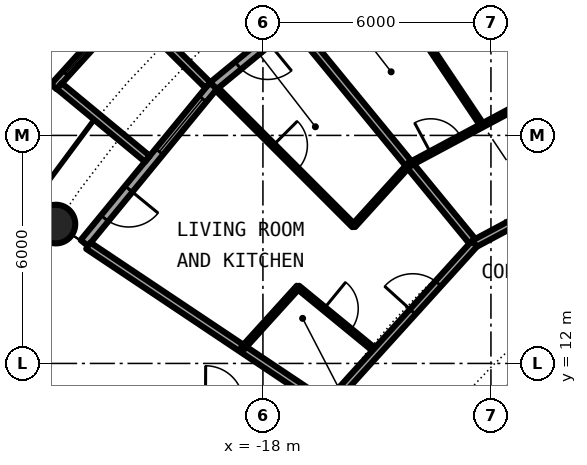
"""IFC4 building model, lengths in metres.
Left out: names, types, materials, properties, quantities, classifications, styles, units other than length and angle.
Written with IfcOpenShell. Run it as: python <this file> out.ifc"""

import sys

from ifc_helpers import new_model, si_unit, direction, frame, frame_2d, origin, origin_2d, place, context, subcontext, project, spatial, rectangle, circle, hollow_circle, extrude, element, fill, save


model = new_model("IFC4")
c1 = context("Model", 3, precision=1e-05, world=origin(), true_north=direction((0.0, 1.0)))
c2 = subcontext(c1, "Body", "Model", "MODEL_VIEW")
j1 = project(units=[si_unit("LENGTHUNIT", "METRE"), si_unit("PLANEANGLEUNIT", "RADIAN")], contexts=[c1])
p1 = place(None, origin())
s1 = spatial("IfcSite", under=j1, at=p1, CompositionType="ELEMENT")
p2 = place(p1, origin())
s2 = spatial("IfcBuilding", under=s1, at=p2, CompositionType="ELEMENT")
p3 = place(p2, frame((0.0, 0.0, 75.8)))
s3 = spatial("IfcBuildingStorey", under=s2, at=p3, CompositionType="ELEMENT", Elevation=75.8)
p4 = place(p3, frame((-23.448, 15.667, 0.0), z_axis=(0.0, 0.0, 1.0), x_axis=(1.0, 0.0, 0.0)))
e1 = element("IfcColumn", 1, at=p4, inside=s3, PredefinedType="COLUMN", context=c2, shape_type="SweptSolid", body=[
    extrude(hollow_circle(Radius=0.508, WallThickness=0.04, at=origin_2d()), origin(), (0.0, 0.0, 1.0), 3.05),
])
p5 = place(p3, frame((-15.167, 22.699, 0.0), z_axis=(0.0, 0.0, 1.0), x_axis=(-0.773019449054, -0.634382322723, 0.0)))
e2 = element("IfcWall", 2, at=p5, inside=s3, PredefinedType="SOLIDWALL", context=c2, shape_type="SweptSolid", body=[
    extrude(rectangle(XDim=5.352, YDim=0.25, at=frame_2d((2.676, 0.0))), origin(), (0.0, 0.0, 1.0), 2.7),
])
p6 = place(p5, frame((0.441, 0.0, 0.3)))
e3 = element("IfcOpeningElement", 3, at=p6, cuts=e2, PredefinedType="OPENING", context=c2, shape_type="SweptSolid", body=[
    extrude(rectangle(XDim=1.8, YDim=2.1, at=frame_2d((0.9, 1.05))), frame((0.0, 0.135, 0.0), z_axis=(0.0, -1.0, 0.0), x_axis=(1.0, 0.0, 0.0)), (0.0, 0.0, 1.0), 0.27),
])
p7 = place(p5, frame((3.51, 0.0, 0.0)))
e4 = element("IfcOpeningElement", 4, at=p7, cuts=e2, PredefinedType="OPENING", context=c2, shape_type="SweptSolid", body=[
    extrude(rectangle(XDim=1.0, YDim=2.2, at=frame_2d((0.5, 1.1))), frame((0.0, 0.135, 0.0), z_axis=(0.0, -1.0, 0.0), x_axis=(1.0, 0.0, 0.0)), (0.0, 0.0, 1.0), 0.27),
])
p8 = place(p3, frame((-19.304, 19.304, 0.0), z_axis=(0.0, 0.0, 1.0), x_axis=(-0.634382322723, -0.773019449054, 0.0)))
e5 = element("IfcWall", 5, at=p8, inside=s3, PredefinedType="SOLIDWALL", context=c2, shape_type="SweptSolid", body=[
    extrude(rectangle(XDim=5.352, YDim=0.25, at=frame_2d((2.676, 0.0))), origin(), (0.0, 0.0, 1.0), 2.7),
])
p9 = place(p8, frame((0.441, 0.0, 0.3)))
e6 = element("IfcOpeningElement", 6, at=p9, cuts=e5, PredefinedType="OPENING", context=c2, shape_type="SweptSolid", body=[
    extrude(rectangle(XDim=1.8, YDim=2.1, at=frame_2d((0.9, 1.05))), frame((0.0, 0.135, 0.0), z_axis=(0.0, -1.0, 0.0), x_axis=(1.0, 0.0, 0.0)), (0.0, 0.0, 1.0), 0.27),
])
p10 = place(p8, frame((3.51, 0.0, 0.0)))
e7 = element("IfcOpeningElement", 7, at=p10, cuts=e5, PredefinedType="OPENING", context=c2, shape_type="SweptSolid", body=[
    extrude(rectangle(XDim=1.0, YDim=2.2, at=frame_2d((0.5, 1.1))), frame((0.0, 0.135, 0.0), z_axis=(0.0, -1.0, 0.0), x_axis=(1.0, 0.0, 0.0)), (0.0, 0.0, 1.0), 0.27),
])
p11 = place(p3, frame((-21.493, 21.5, -0.03), z_axis=(0.0, 0.0, 1.0), x_axis=(-0.671506829416, -0.740998365753, 0.0)))
e8 = element("IfcWall", 8, at=p11, inside=s3, PredefinedType="SOLIDWALL", context=c2, shape_type="SweptSolid", body=[
    extrude(rectangle(XDim=2.993, YDim=0.2, at=frame_2d((1.497, 0.0))), origin(), (0.0, 0.0, 1.0), 2.73),
])
p12 = place(p11, frame((0.457, 0.0, 0.33)))
e9 = element("IfcOpeningElement", 9, at=p12, cuts=e8, PredefinedType="OPENING", context=c2, shape_type="SweptSolid", body=[
    extrude(circle(Radius=1.04, at=frame_2d((1.04, 1.04))), frame((0.0, 0.11, 0.0), z_axis=(0.0, -1.0, 0.0), x_axis=(1.0, 0.0, 0.0)), (0.0, 0.0, 1.0), 0.22),
])
p13 = place(p3, frame((-19.45, 19.323, -0.03), z_axis=(0.0, 0.0, 1.0), x_axis=(-0.709727076896, 0.704476739375, 0.0)))
e10 = element("IfcWall", 10, at=p13, inside=s3, PredefinedType="SOLIDWALL", context=c2, shape_type="SweptSolid", body=[
    extrude(rectangle(XDim=2.883, YDim=0.2, at=frame_2d((1.441, 0.0))), origin(), (0.0, 0.0, 1.0), 2.73),
])
p14 = place(p3, frame((-21.041, 17.384, -0.03), z_axis=(0.0, 0.0, 1.0), x_axis=(-0.770784861449, 0.63709551667, 0.0)))
e11 = element("IfcWall", 11, at=p14, inside=s3, PredefinedType="SOLIDWALL", context=c2, shape_type="SweptSolid", body=[
    extrude(rectangle(XDim=3.006, YDim=0.2, at=frame_2d((1.503, 0.0))), origin(), (0.0, 0.0, 1.0), 2.73),
])
p15 = place(p3, frame((-22.595, 15.098, 0.0), z_axis=(0.0, 0.0, 1.0), x_axis=(0.831382022135, -0.555701298605, 0.0)))
e12 = element("IfcWall", 12, at=p15, inside=s3, PredefinedType="PARTITIONING", context=c2, shape_type="SweptSolid", body=[
    extrude(rectangle(XDim=7.313, YDim=0.2, at=frame_2d((3.657, 0.0))), origin(), (0.0, 0.0, 1.0), 2.7),
])
p16 = place(p3, frame((-19.211, 19.221, 0.0), z_axis=(0.0, 0.0, 1.0), x_axis=(0.706914880313, -0.707298629994, 0.0)))
e13 = element("IfcWall", 13, at=p16, inside=s3, PredefinedType="PARTITIONING", context=c2, shape_type="SweptSolid", body=[
    extrude(rectangle(XDim=5.09, YDim=0.1, at=frame_2d((2.545, 0.0))), origin(), (0.0, 0.0, 1.0), 2.7),
])
p17 = place(p16, frame((2.095, 0.0, 0.0)))
e14 = element("IfcOpeningElement", 14, at=p17, cuts=e13, PredefinedType="OPENING", context=c2, shape_type="SweptSolid", body=[
    extrude(rectangle(XDim=0.9, YDim=2.3, at=frame_2d((0.45, 1.15))), frame((0.0, 0.06, 0.0), z_axis=(0.0, -1.0, 0.0), x_axis=(1.0, 0.0, 0.0)), (0.0, 0.0, 1.0), 0.12),
])
p18 = place(p3, frame((-17.243, 21.005, 0.0), z_axis=(0.0, 0.0, 1.0), x_axis=(0.63447412651, -0.772944100689, 0.0)))
e15 = element("IfcWall", 15, at=p18, inside=s3, PredefinedType="PARTITIONING", context=c2, shape_type="SweptSolid", body=[
    extrude(rectangle(XDim=7.576, YDim=0.2, at=frame_2d((3.788, 0.0))), origin(), (0.0, 0.0, 1.0), 2.7),
])
p19 = place(p3, frame((-17.078, 14.005, 0.0), z_axis=(0.0, 0.0, 1.0), x_axis=(0.773240932873, -0.634112339992, 0.0)))
e16 = element("IfcWall", 16, at=p19, inside=s3, PredefinedType="PARTITIONING", context=c2, shape_type="SweptSolid", body=[
    extrude(rectangle(XDim=2.674, YDim=0.1, at=frame_2d((1.337, 0.0))), origin(), (0.0, 0.0, 1.0), 2.7),
])
p20 = place(p19, frame((0.887, 0.0, 0.0)))
e17 = element("IfcOpeningElement", 17, at=p20, cuts=e16, PredefinedType="OPENING", context=c2, shape_type="SweptSolid", body=[
    extrude(rectangle(XDim=0.9, YDim=2.3, at=frame_2d((0.45, 1.15))), frame((0.0, 0.06, 0.0), z_axis=(0.0, -1.0, 0.0), x_axis=(1.0, 0.0, 0.0)), (0.0, 0.0, 1.0), 0.12),
])
p21 = place(p3, frame((-15.119, 22.581, 0.0), z_axis=(0.0, 0.0, 1.0), x_axis=(0.556271707676, -0.83100047367, 0.0)))
e18 = element("IfcWall", 18, at=p21, inside=s3, PredefinedType="PARTITIONING", context=c2, shape_type="SweptSolid", body=[
    extrude(rectangle(XDim=5.195, YDim=0.1, at=frame_2d((2.598, 0.0))), origin(), (0.0, 0.0, 1.0), 2.7),
])
p22 = place(p3, frame((-12.81, 23.966, 0.0), z_axis=(0.0, 0.0, 1.0), x_axis=(0.47140999111, -0.881914179658, 0.0)))
e19 = element("IfcWall", 19, at=p22, inside=s3, PredefinedType="PARTITIONING", context=c2, shape_type="SweptSolid", body=[
    extrude(rectangle(XDim=5.303, YDim=0.1, at=frame_2d((2.652, 0.0))), origin(), (0.0, 0.0, 1.0), 2.7),
])
p23 = place(p22, frame((2.202, 0.0, 0.0)))
e20 = element("IfcOpeningElement", 20, at=p23, cuts=e19, PredefinedType="OPENING", context=c2, shape_type="SweptSolid", body=[
    extrude(rectangle(XDim=0.9, YDim=2.3, at=frame_2d((0.45, 1.15))), frame((0.0, 0.06, 0.0), z_axis=(0.0, -1.0, 0.0), x_axis=(1.0, 0.0, 0.0)), (0.0, 0.0, 1.0), 0.12),
])
p24 = place(p3, frame((-12.745, 10.358, 0.0), z_axis=(0.0, 0.0, 1.0), x_axis=(0.803191461888, 0.595720971219, 0.0)))
e21 = element("IfcWall", 21, at=p24, inside=s3, PredefinedType="PARTITIONING", context=c2, shape_type="SweptSolid", body=[
    extrude(rectangle(XDim=9.76, YDim=0.2, at=frame_2d((4.88, 0.0))), origin(), (0.0, 0.0, 1.0), 2.7),
])
p25 = place(p24, frame((4.38, 0.0, 0.0)))
e22 = element("IfcOpeningElement", 22, at=p25, cuts=e21, PredefinedType="OPENING", context=c2, shape_type="SweptSolid", body=[
    extrude(rectangle(XDim=1.0, YDim=2.3, at=frame_2d((0.5, 1.15))), frame((0.0, 0.11, 0.0), z_axis=(0.0, -1.0, 0.0), x_axis=(1.0, 0.0, 0.0)), (0.0, 0.0, 1.0), 0.22),
])
p26 = place(p3, frame((-12.434, 15.151, 0.0), z_axis=(0.0, 0.0, 1.0), x_axis=(0.881899173092, 0.47143806433, 0.0)))
e23 = element("IfcWall", 23, at=p26, inside=s3, PredefinedType="PARTITIONING", context=c2, shape_type="SweptSolid", body=[
    extrude(rectangle(XDim=7.647, YDim=0.2, at=frame_2d((3.824, 0.0))), origin(), (0.0, 0.0, 1.0), 2.38),
])
p27 = place(p26, frame((2.55, 0.0, 0.0)))
e24 = element("IfcOpeningElement", 24, at=p27, cuts=e23, PredefinedType="OPENING", context=c2, shape_type="SweptSolid", body=[
    extrude(rectangle(XDim=1.0, YDim=2.3, at=frame_2d((0.5, 1.15))), frame((0.0, 0.11, 0.0), z_axis=(0.0, -1.0, 0.0), x_axis=(1.0, 0.0, 0.0)), (0.0, 0.0, 1.0), 0.22),
])
p28 = place(p3, frame((-16.193, 11.004, 0.0), z_axis=(0.0, 0.0, 1.0), x_axis=(0.671601747072, 0.740912338492, 0.0)))
e25 = element("IfcWall", 25, at=p28, inside=s3, PredefinedType="PARTITIONING", context=c2, shape_type="SweptSolid", body=[
    extrude(rectangle(XDim=5.597, YDim=0.2, at=frame_2d((2.799, 0.0))), origin(), (0.0, 0.0, 1.0), 2.38),
])
p29 = place(p28, frame((3.18, 0.0, 0.0)))
e26 = element("IfcOpeningElement", 26, at=p29, cuts=e25, PredefinedType="OPENING", context=c2, shape_type="SweptSolid", body=[
    extrude(rectangle(XDim=1.0, YDim=2.3, at=frame_2d((0.5, 1.15))), frame((0.0, 0.11, 0.0), z_axis=(0.0, -1.0, 0.0), x_axis=(1.0, 0.0, 0.0)), (0.0, 0.0, 1.0), 0.22),
])
p30 = place(p3, frame((-14.148, 17.236, 0.0), z_axis=(0.0, 0.0, 1.0), x_axis=(0.881763472003, 0.471691826769, 0.0)))
e27 = element("IfcWall", 27, at=p30, inside=s3, PredefinedType="PARTITIONING", context=c2, shape_type="SweptSolid", body=[
    extrude(rectangle(XDim=4.35, YDim=0.1, at=frame_2d((2.175, 0.0))), origin(), (0.0, 0.0, 1.0), 2.7),
])
p31 = place(p30, frame((0.639, 0.0, 0.0)))
e28 = element("IfcOpeningElement", 28, at=p31, cuts=e27, PredefinedType="OPENING", context=c2, shape_type="SweptSolid", body=[
    extrude(rectangle(XDim=0.9, YDim=2.3, at=frame_2d((0.45, 1.15))), frame((0.0, 0.06, 0.0), z_axis=(0.0, -1.0, 0.0), x_axis=(1.0, 0.0, 0.0)), (0.0, 0.0, 1.0), 0.12),
])
p32 = place(p3, frame((-18.538, 12.394, 0.0), z_axis=(0.0, 0.0, 1.0), x_axis=(0.67169789574, 0.740825172937, 0.0)))
e29 = element("IfcWall", 29, at=p32, inside=s3, PredefinedType="PARTITIONING", context=c2, shape_type="SweptSolid", body=[
    extrude(rectangle(XDim=2.183, YDim=0.1, at=frame_2d((1.091, 0.0))), origin(), (0.0, 0.0, 1.0), 2.7),
])
p33 = place(p3, frame((-15.612, 15.622, 0.0), z_axis=(0.0, 0.0, 1.0), x_axis=(0.671674967707, 0.740845960882, 0.0)))
e30 = element("IfcWall", 30, at=p33, inside=s3, PredefinedType="PARTITIONING", context=c2, shape_type="SweptSolid", body=[
    extrude(rectangle(XDim=2.181, YDim=0.1, at=frame_2d((1.091, 0.0))), origin(), (0.0, 0.0, 1.0), 2.7),
])
p34 = place(p7, origin())
e31 = element("IfcDoor", 31, at=p34, inside=s3, OperationType="SINGLE_SWING_LEFT", PredefinedType="DOOR", context=c2, shape_type="SweptSolid", body=[
    extrude(rectangle(XDim=1.0, YDim=2.2, at=frame_2d((0.5, 1.1))), frame((0.0, 0.025, 0.0), z_axis=(0.0, -1.0, 0.0), x_axis=(1.0, 0.0, 0.0)), (0.0, 0.0, 1.0), 0.05),
])
fill(e4, e31)
p35 = place(p9, origin())
e32 = element("IfcWindow", 32, at=p35, inside=s3, PartitioningType="SINGLE_PANEL", PredefinedType="WINDOW", context=c2, shape_type="SweptSolid", body=[
    extrude(rectangle(XDim=1.8, YDim=2.1, at=frame_2d((0.9, 1.05))), frame((0.0, 0.03, 0.0), z_axis=(0.0, -1.0, 0.0), x_axis=(1.0, 0.0, 0.0)), (0.0, 0.0, 1.0), 0.06),
])
fill(e6, e32)
p36 = place(p12, origin())
e33 = element("IfcWindow", 33, at=p36, inside=s3, PartitioningType="SINGLE_PANEL", PredefinedType="WINDOW", context=c2, shape_type="SweptSolid", body=[
    extrude(circle(Radius=1.04, at=frame_2d((1.04, 1.04))), frame((0.0, 0.03, 0.0), z_axis=(0.0, -1.0, 0.0), x_axis=(1.0, 0.0, 0.0)), (0.0, 0.0, 1.0), 0.06),
])
fill(e9, e33)
p37 = place(p10, origin())
e34 = element("IfcDoor", 34, at=p37, inside=s3, OperationType="SINGLE_SWING_LEFT", PredefinedType="DOOR", context=c2, shape_type="SweptSolid", body=[
    extrude(rectangle(XDim=1.0, YDim=2.2, at=frame_2d((0.5, 1.1))), frame((0.0, 0.025, 0.0), z_axis=(0.0, -1.0, 0.0), x_axis=(1.0, 0.0, 0.0)), (0.0, 0.0, 1.0), 0.05),
])
fill(e7, e34)
p38 = place(p31, origin())
e35 = element("IfcDoor", 35, at=p38, inside=s3, OperationType="SINGLE_SWING_LEFT", PredefinedType="DOOR", context=c2, shape_type="SweptSolid", body=[
    extrude(rectangle(XDim=0.9, YDim=2.3, at=frame_2d((0.45, 1.15))), frame((0.0, 0.025, 0.0), z_axis=(0.0, -1.0, 0.0), x_axis=(1.0, 0.0, 0.0)), (0.0, 0.0, 1.0), 0.05),
])
fill(e28, e35)
p39 = place(p29, origin())
e36 = element("IfcDoor", 36, at=p39, inside=s3, OperationType="SINGLE_SWING_RIGHT", PredefinedType="DOOR", context=c2, shape_type="SweptSolid", body=[
    extrude(rectangle(XDim=1.0, YDim=2.3, at=frame_2d((0.5, 1.15))), frame((0.0, 0.025, 0.0), z_axis=(0.0, -1.0, 0.0), x_axis=(1.0, 0.0, 0.0)), (0.0, 0.0, 1.0), 0.05),
])
fill(e26, e36)
p40 = place(p20, origin())
e37 = element("IfcDoor", 37, at=p40, inside=s3, OperationType="SINGLE_SWING_RIGHT", PredefinedType="DOOR", context=c2, shape_type="SweptSolid", body=[
    extrude(rectangle(XDim=0.9, YDim=2.3, at=frame_2d((0.45, 1.15))), frame((0.0, 0.025, 0.0), z_axis=(0.0, -1.0, 0.0), x_axis=(1.0, 0.0, 0.0)), (0.0, 0.0, 1.0), 0.05),
])
fill(e17, e37)
p41 = place(p17, origin())
e38 = element("IfcDoor", 38, at=p41, inside=s3, OperationType="SINGLE_SWING_LEFT", PredefinedType="DOOR", context=c2, shape_type="SweptSolid", body=[
    extrude(rectangle(XDim=0.9, YDim=2.3, at=frame_2d((0.45, 1.15))), frame((0.0, 0.025, 0.0), z_axis=(0.0, -1.0, 0.0), x_axis=(1.0, 0.0, 0.0)), (0.0, 0.0, 1.0), 0.05),
])
fill(e14, e38)
save(model, sys.argv[1])
